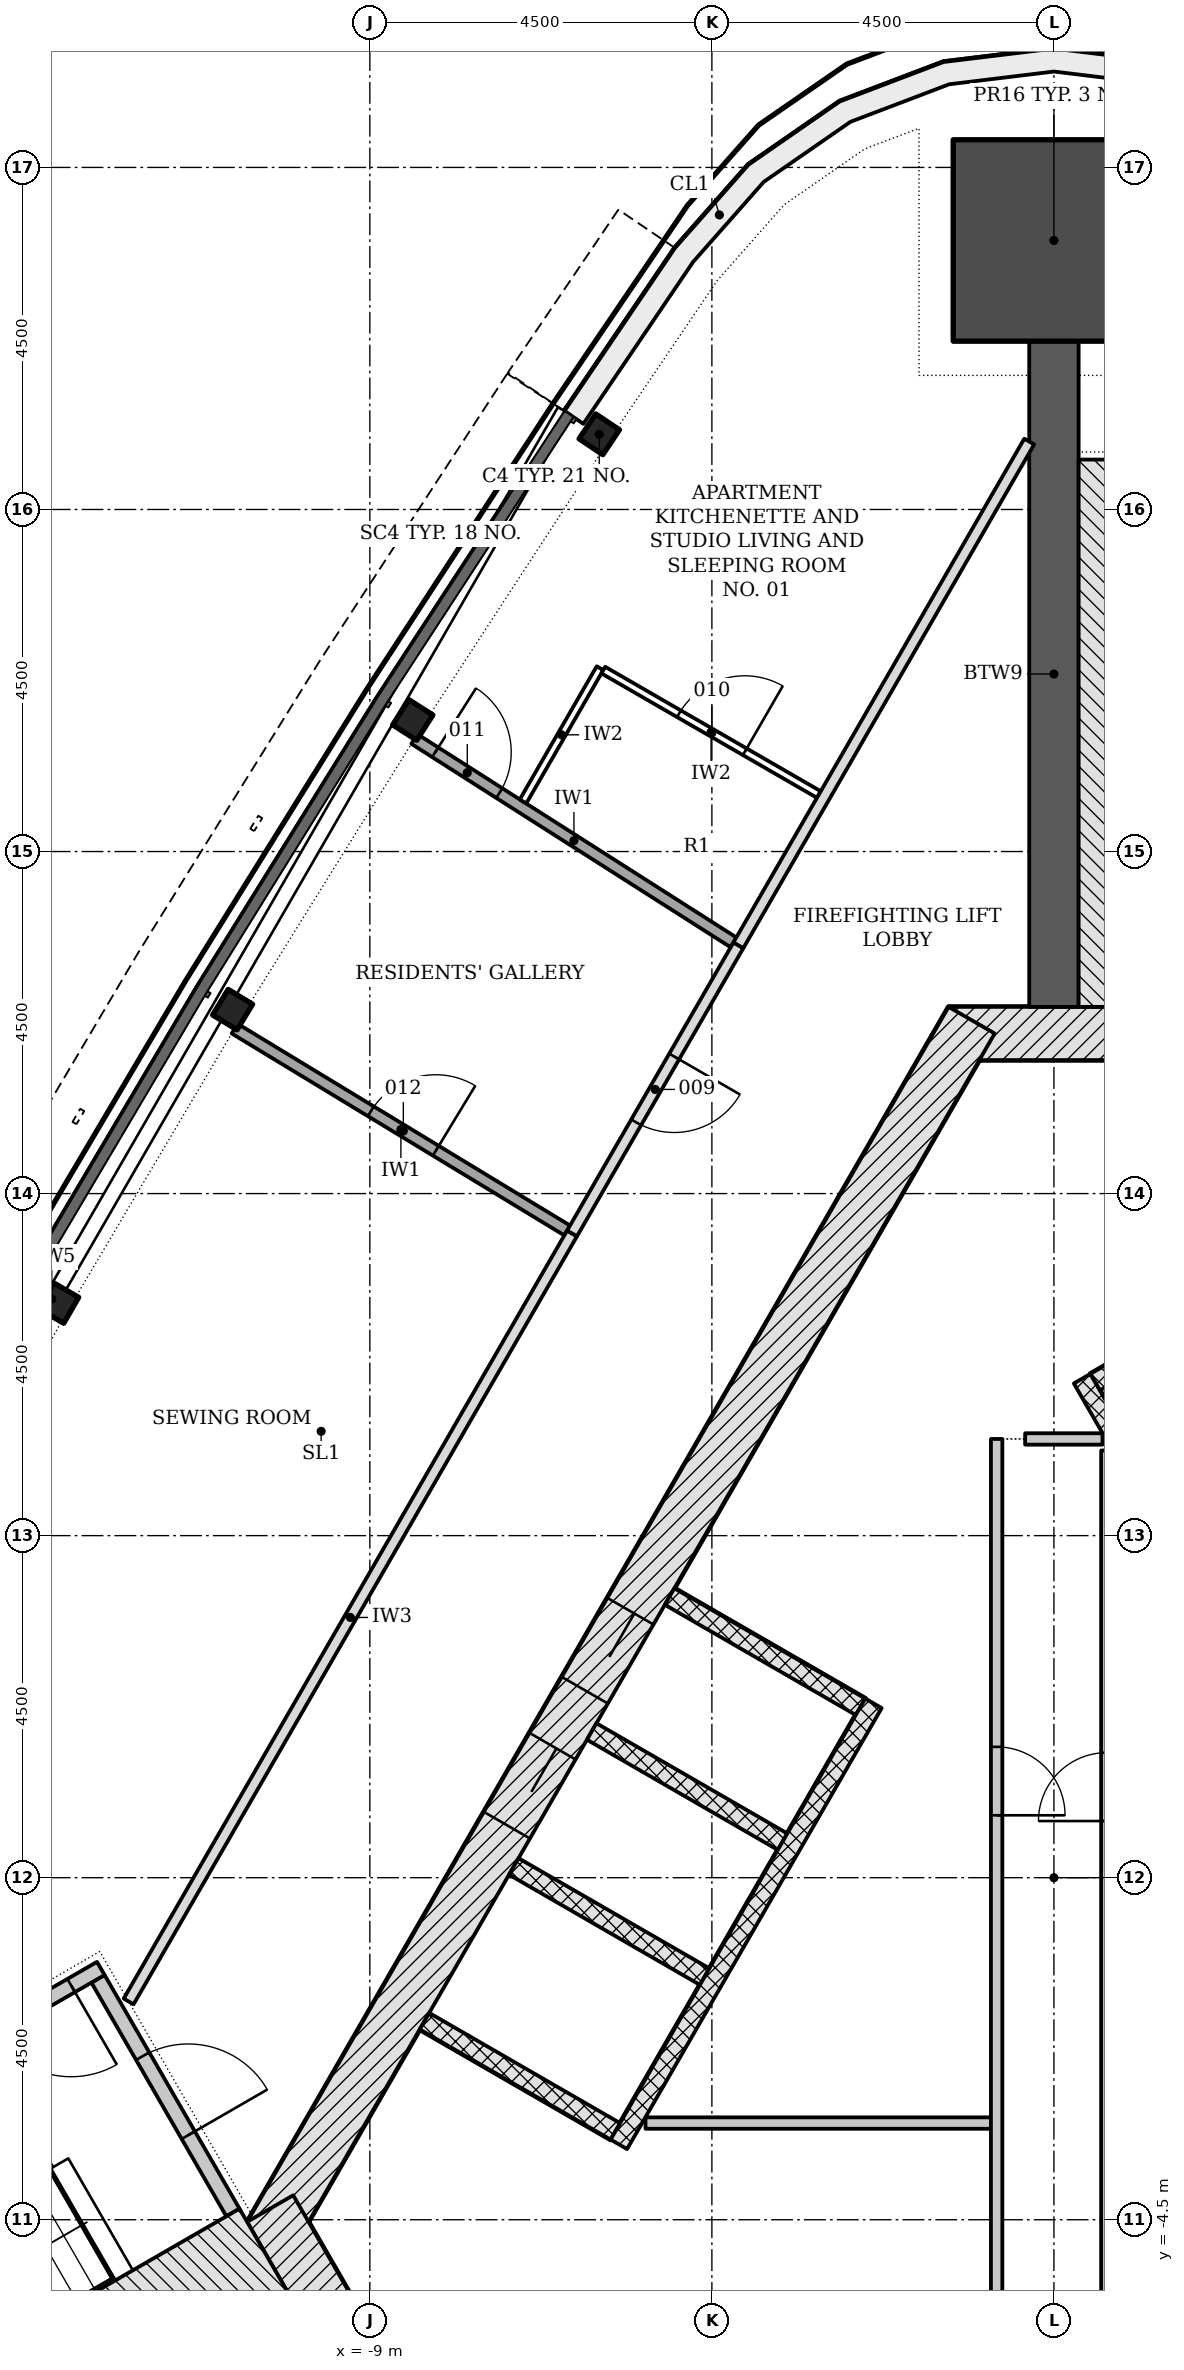
"""IFC4 building model, lengths in metres.
Left out: names, types, materials, properties, quantities, classifications, styles, units other than length and angle.
Written with IfcOpenShell. Run it as: python <this file> out.ifc"""

import sys

from ifc_helpers import new_model, si_unit, direction, frame, frame_2d, origin, origin_2d, place, context, subcontext, project, spatial, polyline, rectangle, i_section, outline, extrude, element, fill, save


model = new_model("IFC4")
c1 = context("Model", 3, precision=1e-05, world=origin(), true_north=direction((0.0, 1.0)))
c2 = subcontext(c1, "Body", "Model", "MODEL_VIEW")
j1 = project(units=[si_unit("LENGTHUNIT", "METRE"), si_unit("PLANEANGLEUNIT", "RADIAN")], contexts=[c1])
p1 = place(None, origin())
s1 = spatial("IfcSite", under=j1, at=p1, CompositionType="ELEMENT")
p2 = place(p1, origin())
s2 = spatial("IfcBuilding", under=s1, at=p2, CompositionType="ELEMENT")
p3 = place(p2, frame((0.0, 0.0, 203.1)))
s3 = spatial("IfcBuildingStorey", under=s2, at=p3, CompositionType="ELEMENT", Elevation=203.1)
p4 = place(p3, frame((1.386, 11.106, -0.2), z_axis=(0.0, 0.0, 1.0), x_axis=(-1.0, 0.0, 0.0)))
e1 = element("IfcWall", 1, at=p4, inside=s3, PredefinedType="SHEAR", context=c2, shape_type="SweptSolid", body=[
    extrude(rectangle(XDim=2.771, YDim=0.7, at=frame_2d((1.386, 0.0))), origin(), (0.0, 0.0, 1.0), 3.6),
])
p5 = place(p3, frame((-1.083, 11.281, -0.2), z_axis=(0.0, 0.0, 1.0), x_axis=(-0.500001446645, -0.866024568562, 0.0)))
e2 = element("IfcWall", 2, at=p5, inside=s3, PredefinedType="SHEAR", context=c2, shape_type="SweptSolid", body=[
    extrude(rectangle(XDim=18.458, YDim=0.7, at=frame_2d((9.229, 0.0))), origin(), (0.0, 0.0, 1.0), 3.6),
])
p6 = place(p5, frame((8.979, 0.0, 0.2)))
e3 = element("IfcOpeningElement", 3, at=p6, cuts=e2, PredefinedType="OPENING", context=c2, shape_type="SweptSolid", body=[
    extrude(rectangle(XDim=1.2, YDim=2.1, at=frame_2d((0.6, 1.05))), frame((0.0, 0.36, 0.0), z_axis=(0.0, -1.0, 0.0), x_axis=(1.0, 0.0, 0.0)), (0.0, 0.0, 1.0), 0.72),
])
p7 = place(p5, frame((11.029, 0.0, 0.2)))
e4 = element("IfcOpeningElement", 4, at=p7, cuts=e2, PredefinedType="OPENING", context=c2, shape_type="SweptSolid", body=[
    extrude(rectangle(XDim=1.2, YDim=2.1, at=frame_2d((0.6, 1.05))), frame((0.0, 0.36, 0.0), z_axis=(0.0, -1.0, 0.0), x_axis=(1.0, 0.0, 0.0)), (0.0, 0.0, 1.0), 0.72),
])
p8 = place(p3, frame((-10.311, -4.353, -0.2), z_axis=(0.0, 0.0, 1.0), x_axis=(0.500042739161, -0.866000726912, 0.0)))
e5 = element("IfcWall", 5, at=p8, inside=s3, PredefinedType="SHEAR", context=c2, shape_type="SweptSolid", body=[
    extrude(rectangle(XDim=2.771, YDim=0.7, at=frame_2d((1.386, 0.0))), origin(), (0.0, 0.0, 1.0), 3.6),
])
p9 = place(p3, frame((0.0, 11.456, -0.2), z_axis=(0.0, 0.0, 1.0), x_axis=(0.0, 1.0, 0.0)))
e6 = element("IfcWall", 6, at=p9, inside=s3, PredefinedType="SHEAR", context=c2, shape_type="SweptSolid", body=[
    extrude(rectangle(XDim=8.758, YDim=0.65, at=frame_2d((4.379, 0.0))), origin(), (0.0, 0.0, 1.0), 3.6),
])
p10 = place(p3, frame((0.0, 21.539, -0.2), z_axis=(0.0, 0.0, 1.0), x_axis=(0.0, 1.0, 0.0)))
e7 = element("IfcColumn", 7, at=p10, inside=s3, PredefinedType="COLUMN", context=c2, shape_type="SweptSolid", body=[
    extrude(rectangle(XDim=2.65, YDim=2.65, at=origin_2d()), origin(), (0.0, 0.0, 1.0), 3.6),
])
for number, where, z_axis, x_axis in (
    (8, (-5.982, 18.989, -0.2), (0.0, 0.0, 1.0), (-0.556, -0.831, 0.0)),
    (9, (-8.435, 15.231, -0.2), (0.0, 0.0, 1.0), (-0.537, -0.843, 0.0)),
    (10, (-10.805, 11.42, -0.2), (0.0, 0.0, 1.0), (-0.519, -0.855, 0.0)),
    (11, (-13.092, 7.558, -0.2), (0.0, 0.0, 1.0), (-0.5, -0.866, 0.0)),
):
    element("IfcColumn", number, at=place(p3, frame(where, z_axis=z_axis, x_axis=x_axis)), inside=s3, PredefinedType="COLUMN", context=c2, shape_type="SweptSolid", body=[
        extrude(i_section(OverallWidth=0.394, OverallDepth=0.376, WebThickness=0.017, FlangeThickness=0.028, FilletRadius=0.015, at=origin_2d()), origin(), (0.0, 0.0, 1.0), 3.6),
    ])
p11 = place(p3, origin())
e12 = element("IfcWall", 12, at=p11, inside=s3, PredefinedType="NOTDEFINED", context=c2, shape_type="SweptSolid", body=[
    extrude(outline(polyline([(6.439, 19.295), (4.985, 21.44), (4.018, 22.536), (2.817, 23.368), (1.451, 23.887), (0.0, 24.064), (-1.451, 23.887), (-2.817, 23.368), (-4.018, 22.536), (-4.985, 21.44), (-6.439, 19.295), (-6.191, 19.126), (-4.748, 21.256), (-3.817, 22.31), (-2.676, 23.1), (-1.378, 23.594), (0.0, 23.761), (1.378, 23.594), (2.676, 23.1), (3.817, 22.31), (4.748, 21.256), (6.191, 19.126), (6.439, 19.295)])), origin(), (0.0, 0.0, 1.0), 3.3),
])
p12 = place(p3, frame((2.706, 7.769, -0.2), z_axis=(0.0, 0.0, 1.0), x_axis=(-0.866022959057, -0.500004234368, 0.0)))
e13 = element("IfcWall", 13, at=p12, inside=s3, PredefinedType="PARTITIONING", context=c2, shape_type="SweptSolid", body=[
    extrude(rectangle(XDim=2.5, YDim=0.25, at=frame_2d((1.25, 0.0))), origin(), (0.0, 0.0, 1.0), 3.6),
])
p13 = place(p3, frame((5.87, -2.961, 0.0), z_axis=(0.0, 0.0, 1.0), x_axis=(-0.50000615651, 0.866021849293, 0.0)))
e14 = element("IfcWall", 14, at=p13, inside=s3, PredefinedType="PARTITIONING", context=c2, shape_type="SweptSolid", body=[
    extrude(rectangle(XDim=11.0, YDim=0.25, at=frame_2d((5.5, 0.0))), origin(), (0.0, 0.0, 1.0), 3.4),
])
for number, where, z_axis, x_axis in (
    (15, (-5.056, 3.699, -0.2), (0.0, 0.0, 1.0), (0.866, -0.5, 0.0)),
    (16, (-6.081, 1.923, -0.2), (0.0, 0.0, 1.0), (0.866, -0.5, 0.0)),
    (17, (-7.106, 0.148, -0.2), (0.0, 0.0, 1.0), (0.866, -0.5, 0.0)),
    (18, (-8.281, -1.887, -0.2), (0.0, 0.0, 1.0), (0.866, -0.5, 0.0)),
):
    element("IfcWall", number, at=place(p3, frame(where, z_axis=z_axis, x_axis=x_axis)), inside=s3, PredefinedType="PARTITIONING", context=c2, shape_type="SweptSolid", body=[
        extrude(rectangle(XDim=2.9, YDim=0.25, at=frame_2d((1.45, 0.0))), origin(), (0.0, 0.0, 1.0), 3.6),
    ])
p14 = place(p3, frame((-2.374, 2.294, 0.0), z_axis=(0.0, 0.0, 1.0), x_axis=(-0.500003174267, -0.866023571113, 0.0)))
e19 = element("IfcWall", 19, at=p14, inside=s3, PredefinedType="PARTITIONING", context=c2, shape_type="SweptSolid", body=[
    extrude(rectangle(XDim=6.7, YDim=0.25, at=frame_2d((3.35, 0.0))), origin(), (0.0, 0.0, 1.0), 3.4),
])
p15 = place(p3, frame((-5.373, -3.228, 0.0), z_axis=(0.0, 0.0, 1.0), x_axis=(1.0, 0.0, 0.0)))
e20 = element("IfcWall", 20, at=p15, inside=s3, PredefinedType="PARTITIONING", context=c2, shape_type="SweptSolid", body=[
    extrude(rectangle(XDim=4.545, YDim=0.15, at=frame_2d((2.272, 0.0))), origin(), (0.0, 0.0, 1.0), 3.4),
])
p16 = place(p3, frame((-0.754, 5.772, 0.0), z_axis=(0.0, 0.0, 1.0), x_axis=(0.0, -1.0, 0.0)))
e21 = element("IfcWall", 21, at=p16, inside=s3, PredefinedType="PARTITIONING", context=c2, shape_type="SweptSolid", body=[
    extrude(rectangle(XDim=12.0, YDim=0.15, at=frame_2d((6.0, 0.0))), origin(), (0.0, 0.0, 1.0), 3.4),
])
p17 = place(p16, frame((4.051, 0.0, 0.0)))
e22 = element("IfcOpeningElement", 22, at=p17, cuts=e21, PredefinedType="OPENING", context=c2, shape_type="SweptSolid", body=[
    extrude(rectangle(XDim=0.9, YDim=2.1, at=frame_2d((0.45, 1.05))), frame((0.0, 0.085, 0.0), z_axis=(0.0, -1.0, 0.0), x_axis=(1.0, 0.0, 0.0)), (0.0, 0.0, 1.0), 0.17),
])
p18 = place(p3, frame((-0.379, 5.772, 0.0), z_axis=(0.0, 0.0, 1.0), x_axis=(1.0, 0.0, 0.0)))
e23 = element("IfcWall", 23, at=p18, inside=s3, PredefinedType="PARTITIONING", context=c2, shape_type="SweptSolid", body=[
    extrude(rectangle(XDim=1.018, YDim=0.15, at=frame_2d((0.509, 0.0))), origin(), (0.0, 0.0, 1.0), 3.4),
])
p19 = place(p3, frame((0.696, -5.928, 0.0), z_axis=(0.0, 0.0, 1.0), x_axis=(0.0, 1.0, 0.0)))
e24 = element("IfcWall", 24, at=p19, inside=s3, PredefinedType="PARTITIONING", context=c2, shape_type="SweptSolid", body=[
    extrude(rectangle(XDim=11.549, YDim=0.15, at=frame_2d((5.774, 0.0))), origin(), (0.0, 0.0, 1.0), 3.4),
])
p20 = place(p19, frame((6.673, 0.0, 0.0)))
e25 = element("IfcOpeningElement", 25, at=p20, cuts=e24, PredefinedType="OPENING", context=c2, shape_type="SweptSolid", body=[
    extrude(rectangle(XDim=0.9, YDim=2.1, at=frame_2d((0.45, 1.05))), frame((0.0, 0.085, 0.0), z_axis=(0.0, -1.0, 0.0), x_axis=(1.0, 0.0, 0.0)), (0.0, 0.0, 1.0), 0.17),
])
p21 = place(p3, frame((0.955, 11.456, -0.2), z_axis=(0.0, 0.0, 1.0), x_axis=(0.0, 1.0, 0.0)))
e26 = element("IfcWall", 26, at=p21, inside=s3, PredefinedType="SHEAR", context=c2, shape_type="SweptSolid", body=[
    extrude(rectangle(XDim=7.2, YDim=1.261, at=frame_2d((3.6, 0.0))), origin(), (0.0, 0.0, 1.0), 3.6),
])
p22 = place(p3, frame((-12.576, -1.331, -0.2), z_axis=(0.0, 0.0, 1.0), x_axis=(0.499970499736, -0.8660424351, 0.0)))
e27 = element("IfcWall", 27, at=p22, inside=s3, PredefinedType="SHEAR", context=c2, shape_type="SweptSolid", body=[
    extrude(rectangle(XDim=3.55, YDim=0.2, at=frame_2d((1.775, 0.0))), origin(), (0.0, 0.0, 1.0), 3.6),
])
p23 = place(p22, frame((1.175, 0.0, 0.2)))
e28 = element("IfcOpeningElement", 28, at=p23, cuts=e27, PredefinedType="OPENING", context=c2, shape_type="SweptSolid", body=[
    extrude(rectangle(XDim=1.2, YDim=2.1, at=frame_2d((0.6, 1.05))), frame((0.0, 0.11, 0.0), z_axis=(0.0, -1.0, 0.0), x_axis=(1.0, 0.0, 0.0)), (0.0, 0.0, 1.0), 0.22),
])
p24 = place(p3, frame((-12.539, -1.194, -0.2), z_axis=(0.0, 0.0, 1.0), x_axis=(-0.866045472092, -0.499965239061, 0.0)))
e29 = element("IfcWall", 29, at=p24, inside=s3, PredefinedType="SHEAR", context=c2, shape_type="SweptSolid", body=[
    extrude(rectangle(XDim=5.6, YDim=0.2, at=frame_2d((2.8, 0.0))), origin(), (0.0, 0.0, 1.0), 3.6),
])
p25 = place(p24, frame((0.45, 0.0, 0.2)))
e30 = element("IfcOpeningElement", 30, at=p25, cuts=e29, PredefinedType="OPENING", context=c2, shape_type="SweptSolid", body=[
    extrude(rectangle(XDim=1.2, YDim=2.1, at=frame_2d((0.6, 1.05))), frame((0.0, 0.11, 0.0), z_axis=(0.0, -1.0, 0.0), x_axis=(1.0, 0.0, 0.0)), (0.0, 0.0, 1.0), 0.22),
])
p26 = place(p3, frame((-10.399, -4.901, -0.2), z_axis=(0.0, 0.0, 1.0), x_axis=(-0.866018442252, -0.500012057535, 0.0)))
e31 = element("IfcWall", 31, at=p26, inside=s3, PredefinedType="SHEAR", context=c2, shape_type="SweptSolid", body=[
    extrude(rectangle(XDim=7.2, YDim=1.261, at=frame_2d((3.6, 0.0))), origin(), (0.0, 0.0, 1.0), 3.6),
])
p27 = place(p3, frame((-0.325, 18.894, 0.0), z_axis=(0.0, 0.0, 1.0), x_axis=(-0.499994868576, -0.866028366393, 0.0)))
e32 = element("IfcWall", 32, at=p27, inside=s3, PredefinedType="PARTITIONING", context=c2, shape_type="SweptSolid", body=[
    extrude(rectangle(XDim=7.654, YDim=0.15, at=frame_2d((3.827, 0.0))), origin(), (0.0, 0.0, 1.0), 2.852),
])
p28 = place(p3, frame((-6.34, 8.476, 0.0), z_axis=(0.0, 0.0, 1.0), x_axis=(-0.499987514004, -0.866032612458, 0.0)))
e33 = element("IfcWall", 33, at=p28, inside=s3, PredefinedType="PARTITIONING", context=c2, shape_type="SweptSolid", body=[
    extrude(rectangle(XDim=11.667, YDim=0.15, at=frame_2d((5.833, 0.0))), origin(), (0.0, 0.0, 1.0), 2.852),
])
p29 = place(p3, frame((-8.414, 14.981, 0.0), z_axis=(0.0, 0.0, 1.0), x_axis=(0.843295819546, -0.537449682051, 0.0)))
e34 = element("IfcWall", 34, at=p29, inside=s3, PredefinedType="PARTITIONING", context=c2, shape_type="SweptSolid", body=[
    extrude(rectangle(XDim=4.979, YDim=0.15, at=frame_2d((2.489, 0.0))), origin(), (0.0, 0.0, 1.0), 3.4),
])
p30 = place(p29, frame((0.325, 0.0, 0.0)))
e35 = element("IfcOpeningElement", 35, at=p30, cuts=e34, PredefinedType="OPENING", context=c2, shape_type="SweptSolid", body=[
    extrude(rectangle(XDim=1.0, YDim=2.1, at=frame_2d((0.5, 1.05))), frame((0.0, 0.085, 0.0), z_axis=(0.0, -1.0, 0.0), x_axis=(1.0, 0.0, 0.0)), (0.0, 0.0, 1.0), 0.17),
])
p31 = place(p3, frame((-10.779, 11.17, 0.0), z_axis=(0.0, 0.0, 1.0), x_axis=(0.854884995592, -0.518817544337, 0.0)))
e36 = element("IfcWall", 36, at=p31, inside=s3, PredefinedType="PARTITIONING", context=c2, shape_type="SweptSolid", body=[
    extrude(rectangle(XDim=5.118, YDim=0.15, at=frame_2d((2.559, 0.0))), origin(), (0.0, 0.0, 1.0), 3.4),
])
p32 = place(p31, frame((2.096, 0.0, 0.0)))
e37 = element("IfcOpeningElement", 37, at=p32, cuts=e36, PredefinedType="OPENING", context=c2, shape_type="SweptSolid", body=[
    extrude(rectangle(XDim=1.0, YDim=2.1, at=frame_2d((0.5, 1.05))), frame((0.0, 0.085, 0.0), z_axis=(0.0, -1.0, 0.0), x_axis=(1.0, 0.0, 0.0)), (0.0, 0.0, 1.0), 0.17),
])
p33 = place(p3, frame((-4.152, 12.265, 0.0), z_axis=(0.0, 0.0, 1.0), x_axis=(-0.500028399337, -0.866009006799, 0.0)))
e38 = element("IfcWall", 38, at=p33, inside=s3, PredefinedType="PARTITIONING", context=c2, shape_type="SweptSolid", body=[
    extrude(rectangle(XDim=4.375, YDim=0.15, at=frame_2d((2.188, 0.0))), origin(), (0.0, 0.0, 1.0), 2.852),
])
p34 = place(p33, frame((1.687, 0.0, 0.0)))
e39 = element("IfcOpeningElement", 39, at=p34, cuts=e38, PredefinedType="OPENING", context=c2, shape_type="SweptSolid", body=[
    extrude(rectangle(XDim=1.0, YDim=2.1, at=frame_2d((0.5, 1.05))), frame((0.0, 0.085, 0.0), z_axis=(0.0, -1.0, 0.0), x_axis=(1.0, 0.0, 0.0)), (0.0, 0.0, 1.0), 0.17),
])
p35 = place(p3, frame((-6.985, 14.159, 0.0), z_axis=(0.0, 0.0, 1.0), x_axis=(0.499990325971, 0.866030989016, 0.0)))
e40 = element("IfcWall", 40, at=p35, inside=s3, PredefinedType="PARTITIONING", context=c2, shape_type="SweptSolid", body=[
    extrude(rectangle(XDim=2.025, YDim=0.1, at=frame_2d((1.012, 0.0))), origin(), (0.0, 0.0, 1.0), 2.852),
])
p36 = place(p3, frame((-5.929, 15.887, 0.0), z_axis=(0.0, 0.0, 1.0), x_axis=(0.866027924134, -0.499995634601, 0.0)))
e41 = element("IfcWall", 41, at=p36, inside=s3, PredefinedType="PARTITIONING", context=c2, shape_type="SweptSolid", body=[
    extrude(rectangle(XDim=3.275, YDim=0.1, at=frame_2d((1.637, 0.0))), origin(), (0.0, 0.0, 1.0), 3.4),
])
p37 = place(p36, frame((1.15, 0.0, 0.0)))
e42 = element("IfcOpeningElement", 42, at=p37, cuts=e41, PredefinedType="OPENING", context=c2, shape_type="SweptSolid", body=[
    extrude(rectangle(XDim=1.0, YDim=2.1, at=frame_2d((0.5, 1.05))), frame((0.0, 0.06, 0.0), z_axis=(0.0, -1.0, 0.0), x_axis=(1.0, 0.0, 0.0)), (0.0, 0.0, 1.0), 0.12),
])
p38 = place(p6, origin())
e43 = element("IfcDoor", 43, at=p38, inside=s3, OperationType="DOUBLE_DOOR_SLIDING", PredefinedType="DOOR", context=c2, shape_type="SweptSolid", body=[
    extrude(rectangle(XDim=1.2, YDim=2.1, at=frame_2d((0.6, 1.05))), frame((0.0, 0.025, 0.0), z_axis=(0.0, -1.0, 0.0), x_axis=(1.0, 0.0, 0.0)), (0.0, 0.0, 1.0), 0.05),
])
fill(e3, e43)
p39 = place(p7, origin())
e44 = element("IfcDoor", 44, at=p39, inside=s3, OperationType="DOUBLE_DOOR_SLIDING", PredefinedType="DOOR", context=c2, shape_type="SweptSolid", body=[
    extrude(rectangle(XDim=1.2, YDim=2.1, at=frame_2d((0.6, 1.05))), frame((0.0, 0.025, 0.0), z_axis=(0.0, -1.0, 0.0), x_axis=(1.0, 0.0, 0.0)), (0.0, 0.0, 1.0), 0.05),
])
fill(e4, e44)
p40 = place(p17, origin())
e45 = element("IfcDoor", 45, at=p40, inside=s3, OperationType="SINGLE_SWING_RIGHT", PredefinedType="DOOR", context=c2, shape_type="SweptSolid", body=[
    extrude(rectangle(XDim=0.9, YDim=2.1, at=frame_2d((0.45, 1.05))), frame((0.0, 0.025, 0.0), z_axis=(0.0, -1.0, 0.0), x_axis=(1.0, 0.0, 0.0)), (0.0, 0.0, 1.0), 0.05),
])
fill(e22, e45)
p41 = place(p20, origin())
e46 = element("IfcDoor", 46, at=p41, inside=s3, OperationType="SINGLE_SWING_LEFT", PredefinedType="DOOR", context=c2, shape_type="SweptSolid", body=[
    extrude(rectangle(XDim=0.9, YDim=2.1, at=frame_2d((0.45, 1.05))), frame((0.0, 0.025, 0.0), z_axis=(0.0, -1.0, 0.0), x_axis=(1.0, 0.0, 0.0)), (0.0, 0.0, 1.0), 0.05),
])
fill(e25, e46)
p42 = place(p23, origin())
e47 = element("IfcDoor", 47, at=p42, inside=s3, OperationType="SINGLE_SWING_RIGHT", PredefinedType="DOOR", context=c2, shape_type="SweptSolid", body=[
    extrude(rectangle(XDim=1.2, YDim=2.1, at=frame_2d((0.6, 1.05))), frame((0.0, 0.025, 0.0), z_axis=(0.0, -1.0, 0.0), x_axis=(1.0, 0.0, 0.0)), (0.0, 0.0, 1.0), 0.05),
])
fill(e28, e47)
p43 = place(p25, origin())
e48 = element("IfcDoor", 48, at=p43, inside=s3, OperationType="SINGLE_SWING_LEFT", PredefinedType="DOOR", context=c2, shape_type="SweptSolid", body=[
    extrude(rectangle(XDim=1.2, YDim=2.1, at=frame_2d((0.6, 1.05))), frame((0.0, 0.025, 0.0), z_axis=(0.0, -1.0, 0.0), x_axis=(1.0, 0.0, 0.0)), (0.0, 0.0, 1.0), 0.05),
])
fill(e30, e48)
p44 = place(p34, origin())
e49 = element("IfcDoor", 49, at=p44, inside=s3, OperationType="SINGLE_SWING_LEFT", PredefinedType="DOOR", context=c2, shape_type="SweptSolid", body=[
    extrude(rectangle(XDim=1.0, YDim=2.1, at=frame_2d((0.5, 1.05))), frame((0.0, 0.025, 0.0), z_axis=(0.0, -1.0, 0.0), x_axis=(1.0, 0.0, 0.0)), (0.0, 0.0, 1.0), 0.05),
])
fill(e39, e49)
p45 = place(p37, origin())
e50 = element("IfcDoor", 50, at=p45, inside=s3, OperationType="SINGLE_SWING_RIGHT", PredefinedType="DOOR", context=c2, shape_type="SweptSolid", body=[
    extrude(rectangle(XDim=1.0, YDim=2.1, at=frame_2d((0.5, 1.05))), frame((0.0, 0.025, 0.0), z_axis=(0.0, -1.0, 0.0), x_axis=(1.0, 0.0, 0.0)), (0.0, 0.0, 1.0), 0.05),
])
fill(e42, e50)
p46 = place(p30, origin())
e51 = element("IfcDoor", 51, at=p46, inside=s3, OperationType="SINGLE_SWING_LEFT", PredefinedType="DOOR", context=c2, shape_type="SweptSolid", body=[
    extrude(rectangle(XDim=1.0, YDim=2.1, at=frame_2d((0.5, 1.05))), frame((0.0, 0.025, 0.0), z_axis=(0.0, -1.0, 0.0), x_axis=(1.0, 0.0, 0.0)), (0.0, 0.0, 1.0), 0.05),
])
fill(e35, e51)
p47 = place(p32, origin())
e52 = element("IfcDoor", 52, at=p47, inside=s3, OperationType="SINGLE_SWING_RIGHT", PredefinedType="DOOR", context=c2, shape_type="SweptSolid", body=[
    extrude(rectangle(XDim=1.0, YDim=2.1, at=frame_2d((0.5, 1.05))), frame((0.0, 0.025, 0.0), z_axis=(0.0, -1.0, 0.0), x_axis=(1.0, 0.0, 0.0)), (0.0, 0.0, 1.0), 0.05),
])
fill(e37, e52)
save(model, sys.argv[1])
